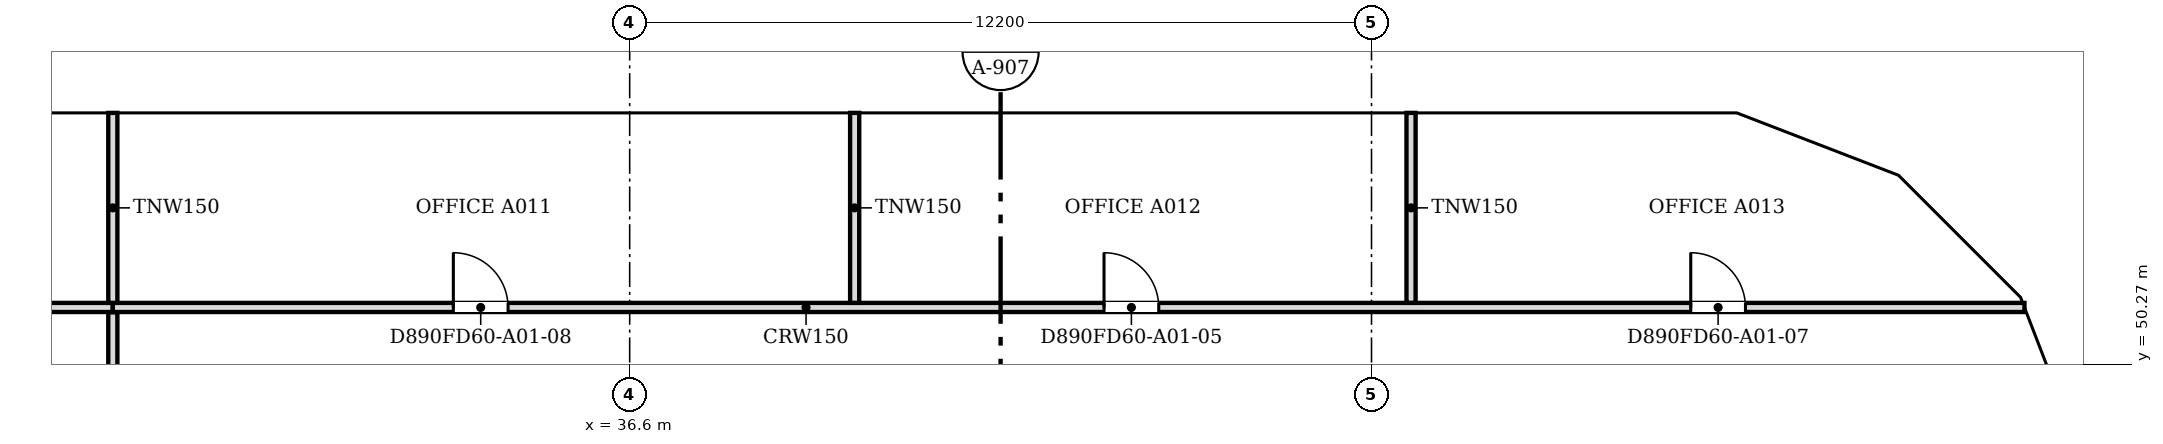
"""IFC4 building model, lengths in metres.
Left out: names, types, materials, properties, quantities, classifications, styles, units other than length and angle.
Written with IfcOpenShell. Run it as: python <this file> out.ifc"""

import sys

from ifc_helpers import new_model, si_unit, direction, frame, frame_2d, origin, place, context, subcontext, project, spatial, polyline, rectangle, outline, extrude, faceted_brep, source, transform, mapped, element, fill, save


model = new_model("IFC4")
c1 = context("Model", 3, precision=1e-05, world=origin(), true_north=direction((0.0, 1.0)))
c2 = subcontext(c1, "Body", "Model", "MODEL_VIEW")
j1 = project(units=[si_unit("LENGTHUNIT", "METRE"), si_unit("PLANEANGLEUNIT", "RADIAN")], contexts=[c1])
p1 = place(None, origin())
s1 = spatial("IfcSite", under=j1, at=p1, CompositionType="ELEMENT")
p2 = place(p1, origin())
s2 = spatial("IfcBuilding", under=s1, at=p2, CompositionType="ELEMENT")
p3 = place(p2, frame((0.0, 0.0, 21.3)))
s3 = spatial("IfcBuildingStorey", under=s2, at=p3, CompositionType="ELEMENT", Elevation=21.3)
m1 = source(origin(), c2, "Body", "Brep", [
    faceted_brep([(0.047, -0.25, 0.0), (2.997, -0.25, 4.5), (0.047, -0.25, 9.0), (0.0, -0.25, 8.93), (0.0, -0.25, 0.07), (0.093, 0.25, 8.929), (2.944, 0.25, 4.581), (2.944, 0.25, 4.419), (0.093, 0.25, 0.071), (2.997, 0.0, 4.5), (0.047, 0.0, 0.0), (0.047, 0.0, 9.0)], [[[0, 1, 2, 3, 4]], [[5, 6, 7, 8]], [[8, 7, 9, 1, 0, 10]], [[6, 5, 11, 2, 1, 9]], [[3, 2, 11]], [[10, 0, 4]], [[8, 10, 4, 3, 11, 5]], [[9, 7, 6]]]),
])
p4 = place(p3, frame((60.767, 48.71, -4.5), z_axis=(0.0, 0.0, 1.0), x_axis=(-0.359901446078, 0.932990326376, 0.0)))
e1 = element("IfcWall", 1, at=p4, inside=s3, PredefinedType="SOLIDWALL", context=c2, shape_type="MappedRepresentation", body=[
    mapped(m1, transform((0.0, 0.0, 0.0), scale=1.0)),
])
m2 = source(origin(), c2, "Body", "SweptSolid", [
    extrude(outline(polyline([(0.247, 0.761), (2.698, 4.5), (0.247, 8.239), (0.247, 0.761)])), frame((0.0, 0.26, 0.0), z_axis=(0.0, -1.0, 0.0), x_axis=(1.0, 0.0, 0.0)), (0.0, 0.0, 1.0), 0.52),
])
p5 = place(p4, origin())
e2 = element("IfcOpeningElement", 2, at=p5, cuts=e1, PredefinedType="OPENING", context=c2, shape_type="MappedRepresentation", body=[
    mapped(m2, transform((0.0, 0.0, 0.0), scale=1.0)),
])
m3 = source(origin(), c2, "Body", "Brep", [
    faceted_brep([(2.944, -0.25, 0.0), (2.997, -0.25, 0.081), (2.997, -0.25, 8.919), (2.944, -0.25, 9.0), (0.0, -0.25, 4.5), (0.053, 0.25, 4.581), (2.891, 0.25, 8.919), (2.891, 0.25, 0.081), (0.053, 0.25, 4.419), (2.944, 0.0, 0.0), (2.944, 0.0, 9.0), (0.0, 0.0, 4.5)], [[[0, 1, 2, 3, 4]], [[5, 6, 7, 8]], [[1, 0, 9]], [[10, 3, 2]], [[6, 5, 11, 4, 3, 10]], [[8, 7, 9, 0, 4, 11]], [[8, 11, 5]], [[1, 9, 7, 6, 10, 2]]]),
])
p6 = place(p3, frame((59.688, 51.506, -4.5), z_axis=(0.0, 0.0, 1.0), x_axis=(-0.707106781187, 0.707106781187, 0.0)))
e3 = element("IfcWall", 3, at=p6, inside=s3, PredefinedType="SOLIDWALL", context=c2, shape_type="MappedRepresentation", body=[
    mapped(m3, transform((0.0, 0.0, 0.0), scale=1.0)),
])
m4 = source(origin(), c2, "Body", "SweptSolid", [
    extrude(outline(polyline([(2.744, 8.238), (0.299, 4.5), (2.744, 0.762), (2.744, 8.238)])), frame((0.0, 0.26, 0.0), z_axis=(0.0, -1.0, 0.0), x_axis=(1.0, 0.0, 0.0)), (0.0, 0.0, 1.0), 0.52),
])
p7 = place(p6, origin())
e4 = element("IfcOpeningElement", 4, at=p7, cuts=e3, PredefinedType="OPENING", context=c2, shape_type="MappedRepresentation", body=[
    mapped(m4, transform((0.0, 0.0, 0.0), scale=1.0)),
])
m5 = source(origin(), c2, "Body", "Brep", [
    faceted_brep([(0.053, -0.25, 0.0), (3.003, -0.25, 4.5), (0.053, -0.25, 9.0), (0.0, -0.25, 8.919), (0.0, -0.25, 0.081), (0.106, 0.25, 8.919), (2.957, 0.25, 4.571), (2.957, 0.25, 4.429), (0.106, 0.25, 0.081), (3.003, 0.0, 4.5), (0.053, 0.0, 0.0), (0.053, 0.0, 9.0)], [[[0, 1, 2, 3, 4]], [[5, 6, 7, 8]], [[8, 7, 9, 1, 0, 10]], [[6, 5, 11, 2, 1, 9]], [[3, 2, 11]], [[10, 0, 4]], [[8, 10, 4, 3, 11, 5]], [[9, 7, 6]]]),
])
p8 = place(p3, frame((57.656, 53.569, -4.5), z_axis=(0.0, 0.0, 1.0), x_axis=(-0.933007896601, 0.359855894603, 0.0)))
e5 = element("IfcWall", 5, at=p8, inside=s3, PredefinedType="SOLIDWALL", context=c2, shape_type="MappedRepresentation", body=[
    mapped(m5, transform((0.0, 0.0, 0.0), scale=1.0)),
])
m6 = source(origin(), c2, "Body", "SweptSolid", [
    extrude(outline(polyline([(0.253, 0.761), (2.705, 4.5), (0.253, 8.239), (0.253, 0.761)])), frame((0.0, 0.26, 0.0), z_axis=(0.0, -1.0, 0.0), x_axis=(1.0, 0.0, 0.0)), (0.0, 0.0, 1.0), 0.52),
])
p9 = place(p8, origin())
e6 = element("IfcOpeningElement", 6, at=p9, cuts=e5, PredefinedType="OPENING", context=c2, shape_type="MappedRepresentation", body=[
    mapped(m6, transform((0.0, 0.0, 0.0), scale=1.0)),
])
m7 = source(origin(), c2, "Body", "Brep", [
    faceted_brep([(3.003, -0.25, 0.0), (6.053, -0.25, 4.5), (3.003, -0.25, 9.0), (0.0, -0.25, 4.5), (0.047, 0.25, 4.57), (3.003, 0.25, 9.0), (6.053, 0.25, 4.5), (3.003, 0.25, 0.0), (0.047, 0.25, 4.43), (0.0, 0.0, 4.5)], [[[0, 1, 2, 3]], [[4, 5, 6, 7, 8]], [[7, 6, 1, 0]], [[6, 5, 2, 1]], [[5, 4, 9, 3, 2]], [[8, 7, 0, 3, 9]], [[8, 9, 4]]]),
])
p10 = place(p3, frame((54.854, 54.65, -4.5), z_axis=(0.0, 0.0, 1.0), x_axis=(-1.0, 0.0, 0.0)))
e7 = element("IfcWall", 7, at=p10, inside=s3, PredefinedType="SOLIDWALL", context=c2, shape_type="MappedRepresentation", body=[
    mapped(m7, transform((0.0, 0.0, 0.0), scale=1.0)),
])
m8 = source(origin(), c2, "Body", "SweptSolid", [
    extrude(outline(polyline([(3.005, 0.448), (5.751, 4.5), (3.005, 8.552), (0.301, 4.5), (3.005, 0.448)])), frame((0.0, 0.26, 0.0), z_axis=(0.0, -1.0, 0.0), x_axis=(1.0, 0.0, 0.0)), (0.0, 0.0, 1.0), 0.52),
])
p11 = place(p10, origin())
e8 = element("IfcOpeningElement", 8, at=p11, cuts=e7, PredefinedType="OPENING", context=c2, shape_type="MappedRepresentation", body=[
    mapped(m8, transform((0.0, 0.0, 0.0), scale=1.0)),
])
m9 = source(origin(), c2, "Body", "SweptSolid", [
    extrude(outline(polyline([(3.05, 0.0), (6.1, 4.5), (3.05, 9.0), (0.0, 4.5), (3.05, 0.0)])), frame((0.0, 0.25, 0.0), z_axis=(0.0, -1.0, 0.0), x_axis=(1.0, 0.0, 0.0)), (0.0, 0.0, 1.0), 0.5),
])
p12 = place(p3, frame((48.8, 54.65, -4.5), z_axis=(0.0, 0.0, 1.0), x_axis=(-1.0, 0.0, 0.0)))
e9 = element("IfcWall", 9, at=p12, inside=s3, PredefinedType="SOLIDWALL", context=c2, shape_type="MappedRepresentation", body=[
    mapped(m9, transform((0.0, 0.0, 0.0), scale=1.0)),
])
m10 = source(origin(), c2, "Body", "SweptSolid", [
    extrude(outline(polyline([(3.05, 0.446), (5.798, 4.5), (3.05, 8.554), (0.302, 4.5), (3.05, 0.446)])), frame((0.0, 0.26, 0.0), z_axis=(0.0, -1.0, 0.0), x_axis=(1.0, 0.0, 0.0)), (0.0, 0.0, 1.0), 0.52),
])
p13 = place(p12, origin())
e10 = element("IfcOpeningElement", 10, at=p13, cuts=e9, PredefinedType="OPENING", context=c2, shape_type="MappedRepresentation", body=[
    mapped(m10, transform((0.0, 0.0, 0.0), scale=1.0)),
])
m11 = source(origin(), c2, "Body", "Brep", [
    faceted_brep([(3.05, -0.25, 0.0), (6.1, -0.25, 4.5), (6.1, -0.25, 4.5), (3.05, -0.25, 9.0), (0.0, -0.25, 4.5), (0.0, 0.25, 4.5), (3.05, 0.25, 9.0), (6.1, 0.25, 4.5), (6.1, 0.25, 4.5), (3.05, 0.25, 0.0)], [[[0, 1, 2, 3, 4]], [[5, 6, 7, 8, 9]], [[9, 8, 1, 0]], [[7, 6, 3, 2]], [[6, 5, 4, 3]], [[5, 9, 0, 4]], [[1, 8, 7, 2]]]),
])
p14 = place(p3, frame((42.7, 54.65, -4.5), z_axis=(0.0, 0.0, 1.0), x_axis=(-1.0, 0.0, 0.0)))
e11 = element("IfcWall", 11, at=p14, inside=s3, PredefinedType="SOLIDWALL", context=c2, shape_type="MappedRepresentation", body=[
    mapped(m11, transform((0.0, 0.0, 0.0), scale=1.0)),
])
p15 = place(p14, origin())
e12 = element("IfcOpeningElement", 12, at=p15, cuts=e11, PredefinedType="OPENING", context=c2, shape_type="MappedRepresentation", body=[
    mapped(m10, transform((0.0, 0.0, 0.0), scale=1.0)),
])
p16 = place(p3, frame((36.6, 54.65, -4.5), z_axis=(0.0, 0.0, 1.0), x_axis=(-1.0, 0.0, 0.0)))
e13 = element("IfcWall", 13, at=p16, inside=s3, PredefinedType="SOLIDWALL", context=c2, shape_type="MappedRepresentation", body=[
    mapped(m9, transform((0.0, 0.0, 0.0), scale=1.0)),
])
p17 = place(p16, origin())
e14 = element("IfcOpeningElement", 14, at=p17, cuts=e13, PredefinedType="OPENING", context=c2, shape_type="MappedRepresentation", body=[
    mapped(m10, transform((0.0, 0.0, 0.0), scale=1.0)),
])
p18 = place(p3, frame((30.5, 54.65, -4.5), z_axis=(0.0, 0.0, 1.0), x_axis=(-1.0, 0.0, 0.0)))
e15 = element("IfcWall", 15, at=p18, inside=s3, PredefinedType="SOLIDWALL", context=c2, shape_type="MappedRepresentation", body=[
    mapped(m9, transform((0.0, 0.0, 0.0), scale=1.0)),
])
p19 = place(p18, origin())
e16 = element("IfcOpeningElement", 16, at=p19, cuts=e15, PredefinedType="OPENING", context=c2, shape_type="MappedRepresentation", body=[
    mapped(m10, transform((0.0, 0.0, 0.0), scale=1.0)),
])
m12 = source(origin(), c2, "Body", "Brep", [
    faceted_brep([(2.95, -0.25, 0.0), (3.003, -0.25, 0.081), (3.003, -0.25, 4.5), (0.0, -0.25, 4.5), (0.047, 0.25, 4.5), (2.898, 0.25, 4.5), (2.898, 0.25, 0.081), (0.047, 0.25, 4.429), (2.95, 0.0, 0.0), (0.0, 0.0, 4.5)], [[[0, 1, 2, 3]], [[4, 5, 6, 7]], [[1, 0, 8]], [[5, 4, 9, 3, 2]], [[7, 6, 8, 0, 3, 9]], [[7, 9, 4]], [[1, 8, 6, 5, 2]]]),
])
p20 = place(p3, frame((60.75, 48.753, 0.0), z_axis=(0.0, 0.0, 1.0), x_axis=(-0.35992665181, 0.932980602862, 0.0)))
e17 = element("IfcWall", 17, at=p20, inside=s3, PredefinedType="SOLIDWALL", context=c2, shape_type="MappedRepresentation", body=[
    mapped(m12, transform((0.0, 0.0, 0.0), scale=1.0)),
])
m13 = source(origin(), c2, "Body", "SweptSolid", [
    extrude(outline(polyline([(2.75, 4.25), (0.463, 4.25), (2.75, 0.761), (2.75, 4.25)])), frame((0.0, 0.26, 0.0), z_axis=(0.0, -1.0, 0.0), x_axis=(1.0, 0.0, 0.0)), (0.0, 0.0, 1.0), 0.52),
])
p21 = place(p20, origin())
e18 = element("IfcOpeningElement", 18, at=p21, cuts=e17, PredefinedType="OPENING", context=c2, shape_type="MappedRepresentation", body=[
    mapped(m13, transform((0.0, 0.0, 0.0), scale=1.0)),
])
m14 = source(origin(), c2, "Body", "Brep", [
    faceted_brep([(0.053, -0.25, 0.0), (2.997, -0.25, 4.5), (0.0, -0.25, 4.5), (0.0, -0.25, 0.081), (0.106, 0.25, 4.5), (2.944, 0.25, 4.5), (2.944, 0.25, 4.419), (0.106, 0.25, 0.081), (2.997, 0.0, 4.5), (0.053, 0.0, 0.0)], [[[0, 1, 2, 3]], [[4, 5, 6, 7]], [[7, 6, 8, 1, 0, 9]], [[5, 4, 2, 1, 8]], [[9, 0, 3]], [[7, 9, 3, 2, 4]], [[6, 5, 8]]]),
])
p22 = place(p3, frame((59.726, 51.469, 0.0), z_axis=(0.0, 0.0, 1.0), x_axis=(-0.707106781187, 0.707106781187, 0.0)))
e19 = element("IfcWall", 19, at=p22, inside=s3, PredefinedType="SOLIDWALL", context=c2, shape_type="MappedRepresentation", body=[
    mapped(m14, transform((0.0, 0.0, 0.0), scale=1.0)),
])
m15 = source(origin(), c2, "Body", "SweptSolid", [
    extrude(outline(polyline([(0.253, 0.762), (2.535, 4.25), (0.253, 4.25), (0.253, 0.762)])), frame((0.0, 0.26, 0.0), z_axis=(0.0, -1.0, 0.0), x_axis=(1.0, 0.0, 0.0)), (0.0, 0.0, 1.0), 0.52),
])
p23 = place(p22, origin())
e20 = element("IfcOpeningElement", 20, at=p23, cuts=e19, PredefinedType="OPENING", context=c2, shape_type="MappedRepresentation", body=[
    mapped(m15, transform((0.0, 0.0, 0.0), scale=1.0)),
])
m16 = source(origin(), c2, "Body", "Brep", [
    faceted_brep([(2.95, -0.25, 0.0), (2.997, -0.25, 0.07), (2.997, -0.25, 4.5), (0.0, -0.25, 4.5), (0.053, 0.25, 4.5), (2.904, 0.25, 4.5), (2.904, 0.25, 0.071), (0.053, 0.25, 4.419), (2.95, 0.0, 0.0), (0.0, 0.0, 4.5)], [[[0, 1, 2, 3]], [[4, 5, 6, 7]], [[1, 0, 8]], [[5, 4, 9, 3, 2]], [[7, 6, 8, 0, 3, 9]], [[7, 9, 4]], [[1, 8, 6, 5, 2]]]),
])
p24 = place(p3, frame((57.606, 53.588, 0.0), z_axis=(0.0, 0.0, 1.0), x_axis=(-0.932990326376, 0.359901446078, 0.0)))
e21 = element("IfcWall", 21, at=p24, inside=s3, PredefinedType="SOLIDWALL", context=c2, shape_type="MappedRepresentation", body=[
    mapped(m16, transform((0.0, 0.0, 0.0), scale=1.0)),
])
p25 = place(p24, origin())
e22 = element("IfcOpeningElement", 22, at=p25, cuts=e21, PredefinedType="OPENING", context=c2, shape_type="MappedRepresentation", body=[
    mapped(m13, transform((0.0, 0.0, 0.0), scale=1.0)),
])
m17 = source(origin(), c2, "Body", "Brep", [
    faceted_brep([(0.047, -0.25, 0.0), (3.05, -0.25, 4.5), (0.0, -0.25, 4.5), (0.0, -0.25, 0.071), (0.093, 0.25, 4.5), (3.05, 0.25, 4.5), (0.093, 0.25, 0.07), (0.047, 0.0, 0.0)], [[[0, 1, 2, 3]], [[4, 5, 6]], [[6, 5, 1, 0, 7]], [[5, 4, 2, 1]], [[7, 0, 3]], [[6, 7, 3, 2, 4]]]),
])
p26 = place(p3, frame((54.9, 54.65, 0.0), z_axis=(0.0, 0.0, 1.0), x_axis=(-1.0, 0.0, 0.0)))
e23 = element("IfcWall", 23, at=p26, inside=s3, PredefinedType="SOLIDWALL", context=c2, shape_type="MappedRepresentation", body=[
    mapped(m17, transform((0.0, 0.0, 0.0), scale=1.0)),
])
m18 = source(origin(), c2, "Body", "SweptSolid", [
    extrude(outline(polyline([(0.247, 0.75), (2.583, 4.25), (0.247, 4.25), (0.247, 0.75)])), frame((0.0, 0.26, 0.0), z_axis=(0.0, -1.0, 0.0), x_axis=(1.0, 0.0, 0.0)), (0.0, 0.0, 1.0), 0.52),
])
p27 = place(p26, origin())
e24 = element("IfcOpeningElement", 24, at=p27, cuts=e23, PredefinedType="OPENING", context=c2, shape_type="MappedRepresentation", body=[
    mapped(m18, transform((0.0, 0.0, 0.0), scale=1.0)),
])
m19 = source(origin(), c2, "Body", "SweptSolid", [
    extrude(outline(polyline([(3.05, 0.0), (6.1, 4.5), (0.0, 4.5), (3.05, 0.0)])), frame((0.0, 0.25, 0.0), z_axis=(0.0, -1.0, 0.0), x_axis=(1.0, 0.0, 0.0)), (0.0, 0.0, 1.0), 0.5),
])
p28 = place(p3, frame((51.85, 54.65, 0.0), z_axis=(0.0, 0.0, 1.0), x_axis=(-1.0, 0.0, 0.0)))
e25 = element("IfcWall", 25, at=p28, inside=s3, PredefinedType="SOLIDWALL", context=c2, shape_type="MappedRepresentation", body=[
    mapped(m19, transform((0.0, 0.0, 0.0), scale=1.0)),
])
m20 = source(origin(), c2, "Body", "SweptSolid", [
    extrude(outline(polyline([(3.05, 0.446), (5.629, 4.25), (0.471, 4.25), (3.05, 0.446)])), frame((0.0, 0.26, 0.0), z_axis=(0.0, -1.0, 0.0), x_axis=(1.0, 0.0, 0.0)), (0.0, 0.0, 1.0), 0.52),
])
p29 = place(p28, origin())
e26 = element("IfcOpeningElement", 26, at=p29, cuts=e25, PredefinedType="OPENING", context=c2, shape_type="MappedRepresentation", body=[
    mapped(m20, transform((0.0, 0.0, 0.0), scale=1.0)),
])
p30 = place(p3, frame((45.75, 54.65, 0.0), z_axis=(0.0, 0.0, 1.0), x_axis=(-1.0, 0.0, 0.0)))
e27 = element("IfcWall", 27, at=p30, inside=s3, PredefinedType="SOLIDWALL", context=c2, shape_type="MappedRepresentation", body=[
    mapped(m19, transform((0.0, 0.0, 0.0), scale=1.0)),
])
p31 = place(p30, origin())
e28 = element("IfcOpeningElement", 28, at=p31, cuts=e27, PredefinedType="OPENING", context=c2, shape_type="MappedRepresentation", body=[
    mapped(m20, transform((0.0, 0.0, 0.0), scale=1.0)),
])
m21 = source(origin(), c2, "Body", "Brep", [
    faceted_brep([(3.05, -0.25, 0.0), (6.1, -0.25, 4.5), (6.1, -0.25, 4.5), (0.0, -0.25, 4.5), (0.0, 0.25, 4.5), (6.1, 0.25, 4.5), (6.1, 0.25, 4.5), (3.05, 0.25, 0.0)], [[[0, 1, 2, 3]], [[4, 5, 6, 7]], [[7, 6, 1, 0]], [[5, 4, 3, 2]], [[4, 7, 0, 3]], [[1, 6, 5, 2]]]),
])
p32 = place(p3, frame((39.65, 54.65, 0.0), z_axis=(0.0, 0.0, 1.0), x_axis=(-1.0, 0.0, 0.0)))
e29 = element("IfcWall", 29, at=p32, inside=s3, PredefinedType="SOLIDWALL", context=c2, shape_type="MappedRepresentation", body=[
    mapped(m21, transform((0.0, 0.0, 0.0), scale=1.0)),
])
p33 = place(p32, origin())
e30 = element("IfcOpeningElement", 30, at=p33, cuts=e29, PredefinedType="OPENING", context=c2, shape_type="MappedRepresentation", body=[
    mapped(m20, transform((0.0, 0.0, 0.0), scale=1.0)),
])
p34 = place(p3, frame((33.55, 54.65, 0.0), z_axis=(0.0, 0.0, 1.0), x_axis=(-1.0, 0.0, 0.0)))
e31 = element("IfcWall", 31, at=p34, inside=s3, PredefinedType="SOLIDWALL", context=c2, shape_type="MappedRepresentation", body=[
    mapped(m19, transform((0.0, 0.0, 0.0), scale=1.0)),
])
p35 = place(p34, origin())
e32 = element("IfcOpeningElement", 32, at=p35, cuts=e31, PredefinedType="OPENING", context=c2, shape_type="MappedRepresentation", body=[
    mapped(m20, transform((0.0, 0.0, 0.0), scale=1.0)),
])
p36 = place(p3, frame((27.45, 54.65, 0.0), z_axis=(0.0, 0.0, 1.0), x_axis=(-1.0, 0.0, 0.0)))
e33 = element("IfcWall", 33, at=p36, inside=s3, PredefinedType="SOLIDWALL", context=c2, shape_type="MappedRepresentation", body=[
    mapped(m21, transform((0.0, 0.0, 0.0), scale=1.0)),
])
p37 = place(p36, origin())
e34 = element("IfcOpeningElement", 34, at=p37, cuts=e33, PredefinedType="OPENING", context=c2, shape_type="MappedRepresentation", body=[
    mapped(m20, transform((0.0, 0.0, 0.0), scale=1.0)),
])
p38 = place(p3, frame((28.1, 47.776, 0.0), z_axis=(0.0, 0.0, 1.0), x_axis=(0.0, 1.0, 0.0)))
e35 = element("IfcWall", 35, at=p38, inside=s3, PredefinedType="PARTITIONING", context=c2, shape_type="SweptSolid", body=[
    extrude(rectangle(XDim=3.348, YDim=0.15, at=frame_2d((1.674, 0.0))), origin(), (0.0, 0.0, 1.0), 3.767),
])
p39 = place(p3, frame((7.5, 51.2, 0.0), z_axis=(0.0, 0.0, 1.0), x_axis=(1.0, 0.0, 0.0)))
e36 = element("IfcWall", 36, at=p39, inside=s3, PredefinedType="PARTITIONING", context=c2, shape_type="SweptSolid", body=[
    extrude(rectangle(XDim=20.599, YDim=0.15, at=frame_2d((10.3, 0.0))), origin(), (0.0, 0.0, 1.0), 3.767),
])
m22 = source(origin(), c2, "Body", "SweptSolid", [
    extrude(rectangle(XDim=1.8, YDim=2.1, at=frame_2d((0.9, 1.05))), frame((0.0, 0.085, 0.0), z_axis=(0.0, -1.0, 0.0), x_axis=(1.0, 0.0, 0.0)), (0.0, 0.0, 1.0), 0.17),
])
p40 = place(p39, frame((15.501, 0.0, 0.0)))
e37 = element("IfcOpeningElement", 37, at=p40, cuts=e36, PredefinedType="OPENING", context=c2, shape_type="MappedRepresentation", body=[
    mapped(m22, transform((0.0, 0.0, 0.0), scale=1.0)),
])
p41 = place(p39, frame((5.2, 0.0, 0.0)))
e38 = element("IfcOpeningElement", 38, at=p41, cuts=e36, PredefinedType="OPENING", context=c2, shape_type="MappedRepresentation", body=[
    mapped(m22, transform((0.0, 0.0, 0.0), scale=1.0)),
])
p42 = place(p3, frame((28.1, 51.2, 0.0), z_axis=(0.0, 0.0, 1.0), x_axis=(1.0, 0.0, 0.0)))
e39 = element("IfcWall", 39, at=p42, inside=s3, PredefinedType="PARTITIONING", context=c2, shape_type="SweptSolid", body=[
    extrude(rectangle(XDim=31.438, YDim=0.15, at=frame_2d((15.719, 0.0))), origin(), (0.0, 0.0, 1.0), 3.767),
])
m23 = source(origin(), c2, "Body", "SweptSolid", [
    extrude(rectangle(XDim=0.9, YDim=2.1, at=frame_2d((0.45, 1.05))), frame((0.0, 0.085, 0.0), z_axis=(0.0, -1.0, 0.0), x_axis=(1.0, 0.0, 0.0)), (0.0, 0.0, 1.0), 0.17),
])
p43 = place(p42, frame((16.301, 0.0, 0.0)))
e40 = element("IfcOpeningElement", 40, at=p43, cuts=e39, PredefinedType="OPENING", context=c2, shape_type="MappedRepresentation", body=[
    mapped(m23, transform((0.0, 0.0, 0.0), scale=1.0)),
])
p44 = place(p42, frame((25.95, 0.0, 0.0)))
e41 = element("IfcOpeningElement", 41, at=p44, cuts=e39, PredefinedType="OPENING", context=c2, shape_type="MappedRepresentation", body=[
    mapped(m23, transform((0.0, 0.0, 0.0), scale=1.0)),
])
p45 = place(p42, frame((5.6, 0.0, 0.0)))
e42 = element("IfcOpeningElement", 42, at=p45, cuts=e39, PredefinedType="OPENING", context=c2, shape_type="MappedRepresentation", body=[
    mapped(m23, transform((0.0, 0.0, 0.0), scale=1.0)),
])
for number, where, z_axis, x_axis in (
    (43, (28.1, 51.276, 0.0), (0.0, 0.0, 1.0), (0.0, 1.0, 0.0)),
    (44, (40.3, 51.276, 0.0), (0.0, 0.0, 1.0), (0.0, 1.0, 0.0)),
    (45, (49.45, 51.276, 0.0), (0.0, 0.0, 1.0), (0.0, 1.0, 0.0)),
):
    element("IfcWall", number, at=place(p3, frame(where, z_axis=z_axis, x_axis=x_axis)), inside=s3, PredefinedType="PARTITIONING", context=c2, shape_type="SweptSolid", body=[
        extrude(rectangle(XDim=3.124, YDim=0.15, at=frame_2d((1.562, 0.0))), origin(), (0.0, 0.0, 1.0), 3.767),
    ])
m24 = source(origin(), c2, "Body", "SweptSolid", [
    extrude(rectangle(XDim=0.9, YDim=2.1, at=frame_2d((0.45, 1.05))), frame((0.0, 0.025, 0.0), z_axis=(0.0, -1.0, 0.0), x_axis=(1.0, 0.0, 0.0)), (0.0, 0.0, 1.0), 0.05),
])
p46 = place(p43, origin())
e46 = element("IfcDoor", 46, at=p46, inside=s3, OperationType="SINGLE_SWING_LEFT", PredefinedType="DOOR", context=c2, shape_type="MappedRepresentation", body=[
    mapped(m24, transform((0.0, 0.0, 0.0), scale=1.0)),
])
fill(e40, e46)
p47 = place(p44, origin())
e47 = element("IfcDoor", 47, at=p47, inside=s3, OperationType="SINGLE_SWING_LEFT", PredefinedType="DOOR", context=c2, shape_type="MappedRepresentation", body=[
    mapped(m24, transform((0.0, 0.0, 0.0), scale=1.0)),
])
fill(e41, e47)
p48 = place(p45, origin())
e48 = element("IfcDoor", 48, at=p48, inside=s3, OperationType="SINGLE_SWING_LEFT", PredefinedType="DOOR", context=c2, shape_type="MappedRepresentation", body=[
    mapped(m24, transform((0.0, 0.0, 0.0), scale=1.0)),
])
fill(e42, e48)
save(model, sys.argv[1])
